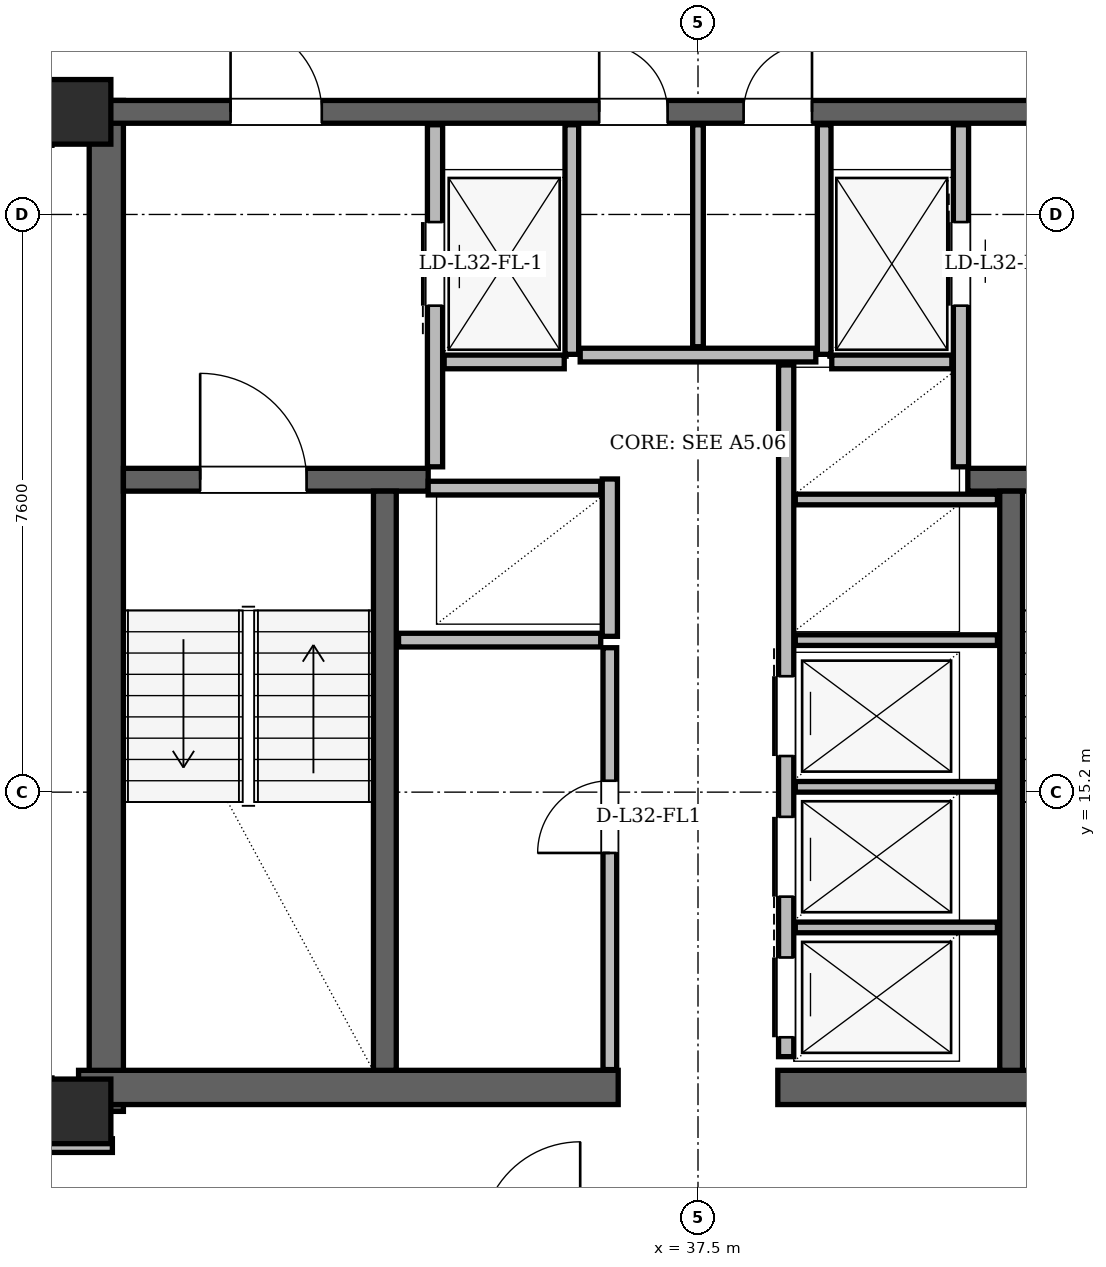
"""IFC4 building model, lengths in metres.
Left out: names, types, materials, properties, quantities, classifications, styles, units other than length and angle.
Written with IfcOpenShell. Run it as: python <this file> out.ifc"""

import sys

from ifc_helpers import new_model, si_unit, direction, frame, frame_2d, origin, origin_2d, place, context, subcontext, project, spatial, rectangle, hollow_rectangle, extrude, element, fill, save


model = new_model("IFC4")
c1 = context("Model", 3, precision=1e-05, world=origin(), true_north=direction((0.0, 1.0)))
c2 = subcontext(c1, "Body", "Model", "MODEL_VIEW")
j1 = project(units=[si_unit("LENGTHUNIT", "METRE"), si_unit("PLANEANGLEUNIT", "RADIAN")], contexts=[c1])
p1 = place(None, origin())
s1 = spatial("IfcSite", under=j1, at=p1, CompositionType="ELEMENT")
p2 = place(p1, origin())
s2 = spatial("IfcBuilding", under=s1, at=p2, CompositionType="ELEMENT")
p3 = place(p2, frame((0.0, 0.0, 123.0)))
s3 = spatial("IfcBuildingStorey", under=s2, at=p3, CompositionType="ELEMENT", Elevation=123.0)
for number, where, z_axis, x_axis in (
    (1, (29.35, 11.0, 0.0), (0.0, 0.0, 1.0), (1.0, 0.0, 0.0)),
    (2, (29.35, 24.15, 0.0), (0.0, 0.0, 1.0), (1.0, 0.0, 0.0)),
):
    element("IfcColumn", number, at=place(p3, frame(where, z_axis=z_axis, x_axis=x_axis)), inside=s3, PredefinedType="COLUMN", context=c2, shape_type="SweptSolid", body=[
        extrude(hollow_rectangle(XDim=0.85, YDim=0.85, WallThickness=0.07, at=origin_2d()), origin(), (0.0, 0.0, 1.0), 3.6),
    ])
p4 = place(p3, frame((29.715, 11.0, 0.0), z_axis=(0.0, 0.0, 1.0), x_axis=(0.0, 1.0, 0.0)))
e3 = element("IfcWall", 3, at=p4, inside=s3, PredefinedType="SHEAR", context=c2, shape_type="SweptSolid", body=[
    extrude(rectangle(XDim=13.3, YDim=0.45, at=frame_2d((6.65, 0.0))), origin(), (0.0, 0.0, 1.0), 3.36),
])
for number, where, z_axis, x_axis in (
    (4, (29.35, 11.315, 0.0), (0.0, 0.0, 1.0), (1.0, 0.0, 0.0)),
    (5, (38.55, 11.315, 0.0), (0.0, 0.0, 1.0), (1.0, 0.0, 0.0)),
):
    element("IfcWall", number, at=place(p3, frame(where, z_axis=z_axis, x_axis=x_axis)), inside=s3, PredefinedType="SHEAR", context=c2, shape_type="SweptSolid", body=[
        extrude(rectangle(XDim=7.1, YDim=0.45, at=frame_2d((3.55, 0.0))), origin(), (0.0, 0.0, 1.0), 3.36),
    ])
p5 = place(p3, frame((29.65, 24.15, 0.0), z_axis=(0.0, 0.0, 1.0), x_axis=(1.0, 0.0, 0.0)))
e6 = element("IfcWall", 6, at=p5, inside=s3, PredefinedType="SHEAR", context=c2, shape_type="SweptSolid", body=[
    extrude(rectangle(XDim=15.7, YDim=0.3, at=frame_2d((7.85, 0.0))), origin(), (0.0, 0.0, 1.0), 3.36),
])
p6 = place(p5, frame((1.7, 0.0, 0.0)))
e7 = element("IfcOpeningElement", 7, at=p6, cuts=e6, PredefinedType="OPENING", context=c2, shape_type="SweptSolid", body=[
    extrude(rectangle(XDim=1.2, YDim=2.2, at=frame_2d((0.6, 1.1))), frame((0.0, 0.15, 0.0), z_axis=(0.0, -1.0, 0.0), x_axis=(1.0, 0.0, 0.0)), (0.0, 0.0, 1.0), 0.3),
])
p7 = place(p5, frame((12.8, 0.0, 0.0)))
e8 = element("IfcOpeningElement", 8, at=p7, cuts=e6, PredefinedType="OPENING", context=c2, shape_type="SweptSolid", body=[
    extrude(rectangle(XDim=1.2, YDim=2.2, at=frame_2d((0.6, 1.1))), frame((0.0, 0.15, 0.0), z_axis=(0.0, -1.0, 0.0), x_axis=(1.0, 0.0, 0.0)), (0.0, 0.0, 1.0), 0.3),
])
p8 = place(p5, frame((6.55, 0.0, 0.0)))
e9 = element("IfcOpeningElement", 9, at=p8, cuts=e6, PredefinedType="OPENING", context=c2, shape_type="SweptSolid", body=[
    extrude(rectangle(XDim=0.9, YDim=2.05, at=frame_2d((0.45, 1.025))), frame((0.0, 0.15, 0.0), z_axis=(0.0, -1.0, 0.0), x_axis=(1.0, 0.0, 0.0)), (0.0, 0.0, 1.0), 0.3),
])
p9 = place(p5, frame((8.45, 0.0, 0.0)))
e10 = element("IfcOpeningElement", 10, at=p9, cuts=e6, PredefinedType="OPENING", context=c2, shape_type="SweptSolid", body=[
    extrude(rectangle(XDim=0.9, YDim=2.05, at=frame_2d((0.45, 1.025))), frame((0.0, 0.15, 0.0), z_axis=(0.0, -1.0, 0.0), x_axis=(1.0, 0.0, 0.0)), (0.0, 0.0, 1.0), 0.3),
])
p10 = place(p3, frame((29.94, 19.31, 0.0), z_axis=(0.0, 0.0, 1.0), x_axis=(1.0, 0.0, 0.0)))
e11 = element("IfcWall", 11, at=p10, inside=s3, PredefinedType="SHEAR", context=c2, shape_type="SweptSolid", body=[
    extrude(rectangle(XDim=4.01, YDim=0.3, at=frame_2d((2.005, 0.0))), origin(), (0.0, 0.0, 1.0), 3.36),
])
p11 = place(p10, frame((1.01, 0.0, 0.0)))
e12 = element("IfcOpeningElement", 12, at=p11, cuts=e11, PredefinedType="OPENING", context=c2, shape_type="SweptSolid", body=[
    extrude(rectangle(XDim=1.4, YDim=2.2, at=frame_2d((0.7, 1.1))), frame((0.0, 0.15, 0.0), z_axis=(0.0, -1.0, 0.0), x_axis=(1.0, 0.0, 0.0)), (0.0, 0.0, 1.0), 0.3),
])
p12 = place(p3, frame((41.05, 19.31, 0.0), z_axis=(0.0, 0.0, 1.0), x_axis=(1.0, 0.0, 0.0)))
e13 = element("IfcWall", 13, at=p12, inside=s3, PredefinedType="SHEAR", context=c2, shape_type="SweptSolid", body=[
    extrude(rectangle(XDim=4.01, YDim=0.3, at=frame_2d((2.005, 0.0))), origin(), (0.0, 0.0, 1.0), 3.36),
])
p13 = place(p12, frame((1.6, 0.0, 0.0)))
e14 = element("IfcOpeningElement", 14, at=p13, cuts=e13, PredefinedType="OPENING", context=c2, shape_type="SweptSolid", body=[
    extrude(rectangle(XDim=1.4, YDim=2.2, at=frame_2d((0.7, 1.1))), frame((0.0, 0.15, 0.0), z_axis=(0.0, -1.0, 0.0), x_axis=(1.0, 0.0, 0.0)), (0.0, 0.0, 1.0), 0.3),
])
for number, where, z_axis, x_axis in (
    (15, (33.38, 11.54, 0.0), (0.0, 0.0, 1.0), (0.0, 1.0, 0.0)),
    (16, (41.62, 11.54, 0.0), (0.0, 0.0, 1.0), (0.0, 1.0, 0.0)),
):
    element("IfcWall", number, at=place(p3, frame(where, z_axis=z_axis, x_axis=x_axis)), inside=s3, PredefinedType="SHEAR", context=c2, shape_type="SweptSolid", body=[
        extrude(rectangle(XDim=7.62, YDim=0.3, at=frame_2d((3.81, 0.0))), origin(), (0.0, 0.0, 1.0), 3.36),
    ])
p14 = place(p3, frame((32.124, 43.397, 0.0), z_axis=(0.0, 0.0, 1.0), x_axis=(-0.499996370967, -0.866027498997, 0.0)))
e17 = element("IfcWall", 17, at=p14, inside=s3, PredefinedType="SOLIDWALL", context=c2, shape_type="SweptSolid", body=[
    extrude(rectangle(XDim=34.976, YDim=0.34, at=frame_2d((17.488, 0.0))), origin(), (0.0, 0.0, 1.0), 2.578),
])
p15 = place(p14, frame((8.034, 0.0, 0.0)))
e18 = element("IfcOpeningElement", 18, at=p15, cuts=e17, PredefinedType="OPENING", context=c2, shape_type="SweptSolid", body=[
    extrude(rectangle(XDim=1.5, YDim=2.2, at=frame_2d((0.75, 1.1))), frame((0.0, 0.17, 0.0), z_axis=(0.0, -1.0, 0.0), x_axis=(1.0, 0.0, 0.0)), (0.0, 0.0, 1.0), 0.34),
])
p16 = place(p14, frame((26.896, 0.0, 0.0)))
e19 = element("IfcOpeningElement", 19, at=p16, cuts=e17, PredefinedType="OPENING", context=c2, shape_type="SweptSolid", body=[
    extrude(rectangle(XDim=1.5, YDim=2.2, at=frame_2d((0.75, 1.1))), frame((0.0, 0.17, 0.0), z_axis=(0.0, -1.0, 0.0), x_axis=(1.0, 0.0, 0.0)), (0.0, 0.0, 1.0), 0.34),
])
p17 = place(p14, frame((32.562, 0.0, 0.85)))
e20 = element("IfcOpeningElement", 20, at=p17, cuts=e17, PredefinedType="OPENING", context=c2, shape_type="SweptSolid", body=[
    extrude(rectangle(XDim=1.4, YDim=1.6, at=frame_2d((0.7, 0.8))), frame((0.0, 0.17, 0.0), z_axis=(0.0, -1.0, 0.0), x_axis=(1.0, 0.0, 0.0)), (0.0, 0.0, 1.0), 0.34),
])
p18 = place(p14, frame((22.614, 0.0, 0.85)))
e21 = element("IfcOpeningElement", 21, at=p18, cuts=e17, PredefinedType="OPENING", context=c2, shape_type="SweptSolid", body=[
    extrude(rectangle(XDim=1.2, YDim=1.48, at=frame_2d((0.6, 0.74))), frame((0.0, 0.17, 0.0), z_axis=(0.0, -1.0, 0.0), x_axis=(1.0, 0.0, 0.0)), (0.0, 0.0, 1.0), 0.34),
])
p19 = place(p14, frame((2.415, 0.0, 0.85)))
e22 = element("IfcOpeningElement", 22, at=p19, cuts=e17, PredefinedType="OPENING", context=c2, shape_type="SweptSolid", body=[
    extrude(rectangle(XDim=1.4, YDim=1.6, at=frame_2d((0.7, 0.8))), frame((0.0, 0.17, 0.0), z_axis=(0.0, -1.0, 0.0), x_axis=(1.0, 0.0, 0.0)), (0.0, 0.0, 1.0), 0.34),
])
p20 = place(p14, frame((13.492, 0.0, 0.85)))
e23 = element("IfcOpeningElement", 23, at=p20, cuts=e17, PredefinedType="OPENING", context=c2, shape_type="SweptSolid", body=[
    extrude(rectangle(XDim=2.5, YDim=1.618, at=frame_2d((1.25, 0.809))), frame((0.0, 0.17, 0.0), z_axis=(0.0, -1.0, 0.0), x_axis=(1.0, 0.0, 0.0)), (0.0, 0.0, 1.0), 0.34),
])
p21 = place(p14, frame((18.281, 0.0, 0.85)))
e24 = element("IfcOpeningElement", 24, at=p21, cuts=e17, PredefinedType="OPENING", context=c2, shape_type="SweptSolid", body=[
    extrude(rectangle(XDim=1.2, YDim=1.48, at=frame_2d((0.6, 0.74))), frame((0.0, 0.17, 0.0), z_axis=(0.0, -1.0, 0.0), x_axis=(1.0, 0.0, 0.0)), (0.0, 0.0, 1.0), 0.34),
])
p22 = place(p14, frame((20.476, 0.0, 0.85)))
e25 = element("IfcOpeningElement", 25, at=p22, cuts=e17, PredefinedType="OPENING", context=c2, shape_type="SweptSolid", body=[
    extrude(rectangle(XDim=1.2, YDim=1.48, at=frame_2d((0.6, 0.74))), frame((0.0, 0.17, 0.0), z_axis=(0.0, -1.0, 0.0), x_axis=(1.0, 0.0, 0.0)), (0.0, 0.0, 1.0), 0.34),
])
p23 = place(p3, frame((34.04, 19.48, 0.0), z_axis=(0.0, 0.0, 1.0), x_axis=(0.0, 1.0, 0.0)))
e26 = element("IfcWall", 26, at=p23, inside=s3, PredefinedType="PARTITIONING", context=c2, shape_type="SweptSolid", body=[
    extrude(rectangle(XDim=4.5, YDim=0.2, at=frame_2d((2.25, 0.0))), origin(), (0.0, 0.0, 1.0), 2.4),
])
p24 = place(p23, frame((2.12, 0.0, 0.0)))
e27 = element("IfcOpeningElement", 27, at=p24, cuts=e26, PredefinedType="OPENING", context=c2, shape_type="SweptSolid", body=[
    extrude(rectangle(XDim=1.1, YDim=2.2, at=frame_2d((0.55, 1.1))), frame((0.0, 0.1, 0.0), z_axis=(0.0, -1.0, 0.0), x_axis=(1.0, 0.0, 0.0)), (0.0, 0.0, 1.0), 0.2),
])
p25 = place(p3, frame((35.84, 20.96, 0.0), z_axis=(0.0, 0.0, 1.0), x_axis=(0.0, 1.0, 0.0)))
e28 = element("IfcWall", 28, at=p25, inside=s3, PredefinedType="PARTITIONING", context=c2, shape_type="SweptSolid", body=[
    extrude(rectangle(XDim=3.02, YDim=0.18, at=frame_2d((1.51, 0.0))), origin(), (0.0, 0.0, 1.0), 2.4),
])
p26 = place(p3, frame((34.16, 20.86, 0.0), z_axis=(0.0, 0.0, 1.0), x_axis=(1.0, 0.0, 0.0)))
e29 = element("IfcWall", 29, at=p26, inside=s3, PredefinedType="PARTITIONING", context=c2, shape_type="SweptSolid", body=[
    extrude(rectangle(XDim=1.58, YDim=0.18, at=frame_2d((0.79, 0.0))), origin(), (0.0, 0.0, 1.0), 3.36),
])
p27 = place(p3, frame((40.96, 19.48, 0.0), z_axis=(0.0, 0.0, 1.0), x_axis=(0.0, 1.0, 0.0)))
e30 = element("IfcWall", 30, at=p27, inside=s3, PredefinedType="PARTITIONING", context=c2, shape_type="SweptSolid", body=[
    extrude(rectangle(XDim=4.5, YDim=0.2, at=frame_2d((2.25, 0.0))), origin(), (0.0, 0.0, 1.0), 2.4),
])
p28 = place(p27, frame((2.12, 0.0, 0.0)))
e31 = element("IfcOpeningElement", 31, at=p28, cuts=e30, PredefinedType="OPENING", context=c2, shape_type="SweptSolid", body=[
    extrude(rectangle(XDim=1.1, YDim=2.2, at=frame_2d((0.55, 1.1))), frame((0.0, 0.1, 0.0), z_axis=(0.0, -1.0, 0.0), x_axis=(1.0, 0.0, 0.0)), (0.0, 0.0, 1.0), 0.2),
])
p29 = place(p3, frame((39.16, 20.96, 0.0), z_axis=(0.0, 0.0, 1.0), x_axis=(0.0, 1.0, 0.0)))
e32 = element("IfcWall", 32, at=p29, inside=s3, PredefinedType="PARTITIONING", context=c2, shape_type="SweptSolid", body=[
    extrude(rectangle(XDim=3.02, YDim=0.18, at=frame_2d((1.51, 0.0))), origin(), (0.0, 0.0, 1.0), 2.4),
])
p30 = place(p3, frame((39.26, 20.86, 0.0), z_axis=(0.0, 0.0, 1.0), x_axis=(1.0, 0.0, 0.0)))
e33 = element("IfcWall", 33, at=p30, inside=s3, PredefinedType="PARTITIONING", context=c2, shape_type="SweptSolid", body=[
    extrude(rectangle(XDim=1.58, YDim=0.18, at=frame_2d((0.79, 0.0))), origin(), (0.0, 0.0, 1.0), 3.36),
])
p31 = place(p3, frame((36.34, 17.25, 0.0), z_axis=(0.0, 0.0, 1.0), x_axis=(0.0, 1.0, 0.0)))
e34 = element("IfcWall", 34, at=p31, inside=s3, PredefinedType="PARTITIONING", context=c2, shape_type="SweptSolid", body=[
    extrude(rectangle(XDim=2.07, YDim=0.2, at=frame_2d((1.035, 0.0))), origin(), (0.0, 0.0, 1.0), 3.36),
])
p32 = place(p3, frame((33.95, 19.2, 0.0), z_axis=(0.0, 0.0, 1.0), x_axis=(1.0, 0.0, 0.0)))
e35 = element("IfcWall", 35, at=p32, inside=s3, PredefinedType="PARTITIONING", context=c2, shape_type="SweptSolid", body=[
    extrude(rectangle(XDim=2.27, YDim=0.18, at=frame_2d((1.135, 0.0))), origin(), (0.0, 0.0, 1.0), 3.36),
])
p33 = place(p3, frame((33.56, 17.2, 0.0), z_axis=(0.0, 0.0, 1.0), x_axis=(1.0, 0.0, 0.0)))
e36 = element("IfcWall", 36, at=p33, inside=s3, PredefinedType="PARTITIONING", context=c2, shape_type="SweptSolid", body=[
    extrude(rectangle(XDim=2.66, YDim=0.18, at=frame_2d((1.33, 0.0))), origin(), (0.0, 0.0, 1.0), 3.36),
])
p34 = place(p3, frame((36.34, 11.55, 0.0), z_axis=(0.0, 0.0, 1.0), x_axis=(0.0, 1.0, 0.0)))
e37 = element("IfcWall", 37, at=p34, inside=s3, PredefinedType="PARTITIONING", context=c2, shape_type="SweptSolid", body=[
    extrude(rectangle(XDim=5.55, YDim=0.18, at=frame_2d((2.775, 0.0))), origin(), (0.0, 0.0, 1.0), 3.36),
])
p35 = place(p34, frame((2.85, 0.0, 0.0)))
e38 = element("IfcOpeningElement", 38, at=p35, cuts=e37, PredefinedType="OPENING", context=c2, shape_type="SweptSolid", body=[
    extrude(rectangle(XDim=0.95, YDim=2.1, at=frame_2d((0.475, 1.05))), frame((0.0, 0.09, 0.0), z_axis=(0.0, -1.0, 0.0), x_axis=(1.0, 0.0, 0.0)), (0.0, 0.0, 1.0), 0.18),
])
p36 = place(p3, frame((38.66, 11.72, 0.0), z_axis=(0.0, 0.0, 1.0), x_axis=(0.0, 1.0, 0.0)))
e39 = element("IfcWall", 39, at=p36, inside=s3, PredefinedType="PARTITIONING", context=c2, shape_type="SweptSolid", body=[
    extrude(rectangle(XDim=9.1, YDim=0.2, at=frame_2d((4.55, 0.0))), origin(), (0.0, 0.0, 1.0), 3.36),
])
p37 = place(p36, frame((0.255, 0.0, 0.0)))
e40 = element("IfcOpeningElement", 40, at=p37, cuts=e39, PredefinedType="OPENING", context=c2, shape_type="SweptSolid", body=[
    extrude(rectangle(XDim=1.05, YDim=2.15, at=frame_2d((0.525, 1.075))), frame((0.0, 0.1, 0.0), z_axis=(0.0, -1.0, 0.0), x_axis=(1.0, 0.0, 0.0)), (0.0, 0.0, 1.0), 0.2),
])
p38 = place(p36, frame((2.105, 0.0, 0.0)))
e41 = element("IfcOpeningElement", 41, at=p38, cuts=e39, PredefinedType="OPENING", context=c2, shape_type="SweptSolid", body=[
    extrude(rectangle(XDim=1.05, YDim=2.15, at=frame_2d((0.525, 1.075))), frame((0.0, 0.1, 0.0), z_axis=(0.0, -1.0, 0.0), x_axis=(1.0, 0.0, 0.0)), (0.0, 0.0, 1.0), 0.2),
])
p39 = place(p36, frame((3.955, 0.0, 0.0)))
e42 = element("IfcOpeningElement", 42, at=p39, cuts=e39, PredefinedType="OPENING", context=c2, shape_type="SweptSolid", body=[
    extrude(rectangle(XDim=1.05, YDim=2.15, at=frame_2d((0.525, 1.075))), frame((0.0, 0.1, 0.0), z_axis=(0.0, -1.0, 0.0), x_axis=(1.0, 0.0, 0.0)), (0.0, 0.0, 1.0), 0.2),
])
for number, where, z_axis, x_axis in (
    (43, (38.78, 13.42, 0.0), (0.0, 0.0, 1.0), (1.0, 0.0, 0.0)),
    (44, (38.78, 15.27, 0.0), (0.0, 0.0, 1.0), (1.0, 0.0, 0.0)),
    (45, (38.78, 17.2, 0.0), (0.0, 0.0, 1.0), (1.0, 0.0, 0.0)),
    (46, (38.78, 19.05, 0.0), (0.0, 0.0, 1.0), (1.0, 0.0, 0.0)),
):
    element("IfcWall", number, at=place(p3, frame(where, z_axis=z_axis, x_axis=x_axis)), inside=s3, PredefinedType="PARTITIONING", context=c2, shape_type="SweptSolid", body=[
        extrude(rectangle(XDim=2.66, YDim=0.14, at=frame_2d((1.33, 0.0))), origin(), (0.0, 0.0, 1.0), 3.36),
    ])
p40 = place(p3, frame((35.95, 20.95, 0.0), z_axis=(0.0, 0.0, 1.0), x_axis=(1.0, 0.0, 0.0)))
e47 = element("IfcWall", 47, at=p40, inside=s3, PredefinedType="PARTITIONING", context=c2, shape_type="SweptSolid", body=[
    extrude(rectangle(XDim=3.1, YDim=0.18, at=frame_2d((1.55, 0.0))), origin(), (0.0, 0.0, 1.0), 3.36),
])
p41 = place(p3, frame((37.5, 21.06, 0.0), z_axis=(0.0, 0.0, 1.0), x_axis=(0.0, 1.0, 0.0)))
e48 = element("IfcWall", 48, at=p41, inside=s3, PredefinedType="PARTITIONING", context=c2, shape_type="SweptSolid", body=[
    extrude(rectangle(XDim=2.92, YDim=0.14, at=frame_2d((1.46, 0.0))), origin(), (0.0, 0.0, 1.0), 2.4),
])
p42 = place(p3, frame((28.905, 10.55, 0.0), z_axis=(0.0, 0.0, 1.0), x_axis=(1.0, 0.0, 0.0)))
e49 = element("IfcWall", 49, at=p42, inside=s3, PredefinedType="PARTITIONING", context=c2, shape_type="SweptSolid", body=[
    extrude(rectangle(XDim=0.89, YDim=0.18, at=frame_2d((0.445, 0.0))), origin(), (0.0, 0.0, 1.0), 3.36),
])
p43 = place(p35, origin())
e50 = element("IfcDoor", 50, at=p43, inside=s3, OperationType="SINGLE_SWING_LEFT", PredefinedType="DOOR", context=c2, shape_type="SweptSolid", body=[
    extrude(rectangle(XDim=0.95, YDim=2.1, at=frame_2d((0.475, 1.05))), frame((0.0, 0.025, 0.0), z_axis=(0.0, -1.0, 0.0), x_axis=(1.0, 0.0, 0.0)), (0.0, 0.0, 1.0), 0.05),
])
fill(e38, e50)
p44 = place(p24, origin())
e51 = element("IfcDoor", 51, at=p44, inside=s3, OperationType="SLIDING_TO_LEFT", PredefinedType="DOOR", context=c2, shape_type="SweptSolid", body=[
    extrude(rectangle(XDim=1.1, YDim=2.2, at=frame_2d((0.55, 1.1))), frame((0.0, 0.025, 0.0), z_axis=(0.0, -1.0, 0.0), x_axis=(1.0, 0.0, 0.0)), (0.0, 0.0, 1.0), 0.05),
])
fill(e27, e51)
p45 = place(p28, origin())
e52 = element("IfcDoor", 52, at=p45, inside=s3, OperationType="SLIDING_TO_RIGHT", PredefinedType="DOOR", context=c2, shape_type="SweptSolid", body=[
    extrude(rectangle(XDim=1.1, YDim=2.2, at=frame_2d((0.55, 1.1))), frame((0.0, 0.025, 0.0), z_axis=(0.0, -1.0, 0.0), x_axis=(1.0, 0.0, 0.0)), (0.0, 0.0, 1.0), 0.05),
])
fill(e31, e52)
p46 = place(p37, origin())
e53 = element("IfcDoor", 53, at=p46, inside=s3, OperationType="SLIDING_TO_RIGHT", PredefinedType="DOOR", context=c2, shape_type="SweptSolid", body=[
    extrude(rectangle(XDim=1.05, YDim=2.15, at=frame_2d((0.525, 1.075))), frame((0.0, 0.025, 0.0), z_axis=(0.0, -1.0, 0.0), x_axis=(1.0, 0.0, 0.0)), (0.0, 0.0, 1.0), 0.05),
])
fill(e40, e53)
p47 = place(p38, origin())
e54 = element("IfcDoor", 54, at=p47, inside=s3, OperationType="SLIDING_TO_LEFT", PredefinedType="DOOR", context=c2, shape_type="SweptSolid", body=[
    extrude(rectangle(XDim=1.05, YDim=2.15, at=frame_2d((0.525, 1.075))), frame((0.0, 0.025, 0.0), z_axis=(0.0, -1.0, 0.0), x_axis=(1.0, 0.0, 0.0)), (0.0, 0.0, 1.0), 0.05),
])
fill(e41, e54)
p48 = place(p39, origin())
e55 = element("IfcDoor", 55, at=p48, inside=s3, OperationType="SLIDING_TO_RIGHT", PredefinedType="DOOR", context=c2, shape_type="SweptSolid", body=[
    extrude(rectangle(XDim=1.05, YDim=2.15, at=frame_2d((0.525, 1.075))), frame((0.0, 0.025, 0.0), z_axis=(0.0, -1.0, 0.0), x_axis=(1.0, 0.0, 0.0)), (0.0, 0.0, 1.0), 0.05),
])
fill(e42, e55)
p49 = place(p11, origin())
e56 = element("IfcDoor", 56, at=p49, inside=s3, OperationType="SINGLE_SWING_LEFT", PredefinedType="DOOR", context=c2, shape_type="SweptSolid", body=[
    extrude(rectangle(XDim=1.4, YDim=2.2, at=frame_2d((0.7, 1.1))), frame((0.0, 0.025, 0.0), z_axis=(0.0, -1.0, 0.0), x_axis=(1.0, 0.0, 0.0)), (0.0, 0.0, 1.0), 0.05),
])
fill(e12, e56)
p50 = place(p6, origin())
e57 = element("IfcDoor", 57, at=p50, inside=s3, OperationType="SINGLE_SWING_LEFT", PredefinedType="DOOR", context=c2, shape_type="SweptSolid", body=[
    extrude(rectangle(XDim=1.2, YDim=2.2, at=frame_2d((0.6, 1.1))), frame((0.0, 0.025, 0.0), z_axis=(0.0, -1.0, 0.0), x_axis=(1.0, 0.0, 0.0)), (0.0, 0.0, 1.0), 0.05),
])
fill(e7, e57)
p51 = place(p8, origin())
e58 = element("IfcDoor", 58, at=p51, inside=s3, OperationType="SINGLE_SWING_LEFT", PredefinedType="DOOR", context=c2, shape_type="SweptSolid", body=[
    extrude(rectangle(XDim=0.9, YDim=2.05, at=frame_2d((0.45, 1.025))), frame((0.0, 0.025, 0.0), z_axis=(0.0, -1.0, 0.0), x_axis=(1.0, 0.0, 0.0)), (0.0, 0.0, 1.0), 0.05),
])
fill(e9, e58)
p52 = place(p9, origin())
e59 = element("IfcDoor", 59, at=p52, inside=s3, OperationType="SINGLE_SWING_RIGHT", PredefinedType="DOOR", context=c2, shape_type="SweptSolid", body=[
    extrude(rectangle(XDim=0.9, YDim=2.05, at=frame_2d((0.45, 1.025))), frame((0.0, 0.025, 0.0), z_axis=(0.0, -1.0, 0.0), x_axis=(1.0, 0.0, 0.0)), (0.0, 0.0, 1.0), 0.05),
])
fill(e10, e59)
save(model, sys.argv[1])
